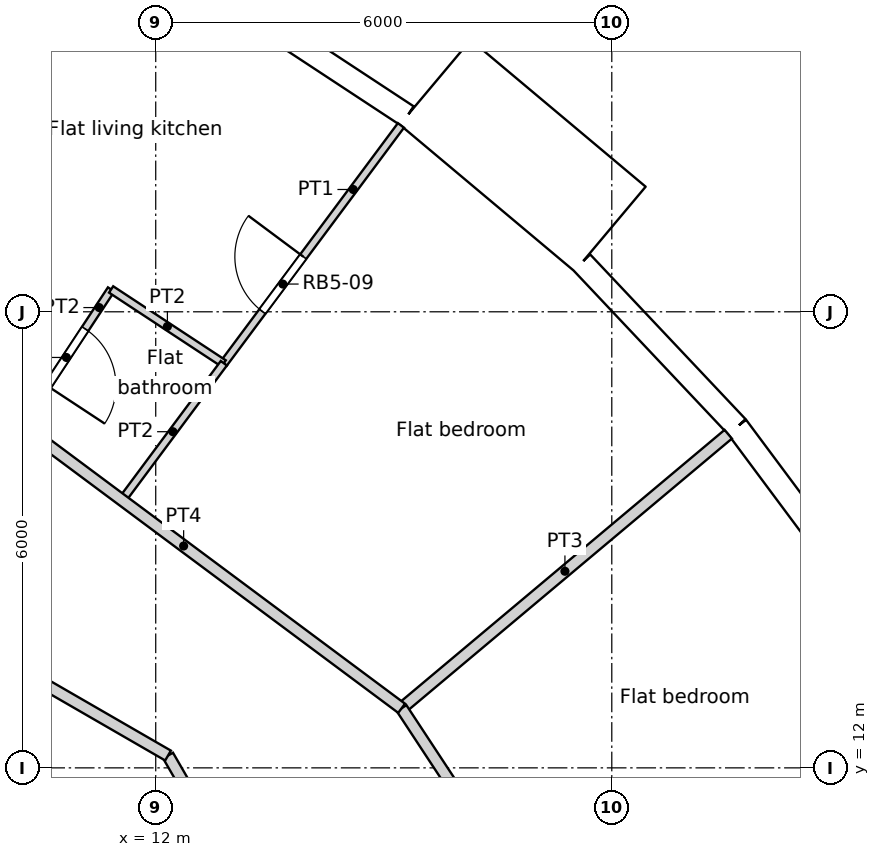
"""IFC4 building model, lengths in metres.
Left out: names, types, materials, properties, quantities, classifications, styles, units other than length and angle.
Written with IfcOpenShell. Run it as: python <this file> out.ifc"""

import sys

from ifc_helpers import new_model, si_unit, direction, frame, frame_2d, origin, origin_2d, place, context, subcontext, project, spatial, rectangle, circle, extrude, element, fill, save


model = new_model("IFC4")
c1 = context("Model", 3, precision=1e-05, world=origin(), true_north=direction((0.0, 1.0)))
c2 = subcontext(c1, "Body", "Model", "MODEL_VIEW")
j1 = project(units=[si_unit("LENGTHUNIT", "METRE"), si_unit("PLANEANGLEUNIT", "RADIAN")], contexts=[c1])
p1 = place(None, origin())
s1 = spatial("IfcSite", under=j1, at=p1, CompositionType="ELEMENT")
p2 = place(p1, origin())
s2 = spatial("IfcBuilding", under=s1, at=p2, CompositionType="ELEMENT")
p3 = place(p2, frame((0.0, 0.0, 169.2)))
s3 = spatial("IfcBuildingStorey", under=s2, at=p3, CompositionType="ELEMENT", Elevation=169.2)
for number, where, z_axis, x_axis in (
    (1, (18.805, 15.779, 0.0), (0.0, 0.0, 1.0), (1.0, 0.0, 0.0)),
    (2, (14.659, 19.69, 0.0), (0.0, 0.0, 1.0), (1.0, 0.0, 0.0)),
):
    element("IfcColumn", number, at=place(p3, frame(where, z_axis=z_axis, x_axis=x_axis)), inside=s3, PredefinedType="COLUMN", context=c2, shape_type="SweptSolid", body=[
        extrude(circle(Radius=0.6, at=origin_2d()), origin(), (0.0, 0.0, 1.0), 3.6),
    ])
p4 = place(p3, frame((11.735, 14.716, 0.0), z_axis=(0.0, 0.0, 1.0), x_axis=(1.0, 0.0, 0.0)))
e3 = element("IfcColumn", 3, at=p4, inside=s3, PredefinedType="COLUMN", context=c2, shape_type="SweptSolid", body=[
    extrude(circle(Radius=0.65, at=origin_2d()), origin(), (0.0, 0.0, 1.0), 3.6),
])
p5 = place(p3, frame((21.422, 14.101, 0.0), z_axis=(0.0, 0.0, 1.0), x_axis=(-0.597197580538, 0.80209416517, 0.0)))
e4 = element("IfcWall", 4, at=p5, inside=s3, PredefinedType="SOLIDWALL", context=c2, shape_type="SweptSolid", body=[
    extrude(rectangle(XDim=2.973, YDim=0.3, at=frame_2d((1.486, 0.0))), origin(), (0.0, 0.0, 1.0), 3.3),
])
p6 = place(p5, frame((1.486, 0.0, 1.55)))
e5 = element("IfcOpeningElement", 5, at=p6, cuts=e4, PredefinedType="OPENING", context=c2, shape_type="SweptSolid", body=[
    extrude(circle(Radius=0.9, at=origin_2d()), frame((0.0, 0.16, 0.0), z_axis=(0.0, -1.0, 0.0), x_axis=(1.0, 0.0, 0.0)), (0.0, 0.0, 1.0), 0.32),
])
p7 = place(p3, frame((19.647, 16.486, 0.0), z_axis=(0.0, 0.0, 1.0), x_axis=(-0.686235184166, 0.727379730273, 0.0)))
e6 = element("IfcWall", 6, at=p7, inside=s3, PredefinedType="SOLIDWALL", context=c2, shape_type="SweptSolid", body=[
    extrude(rectangle(XDim=2.973, YDim=0.3, at=frame_2d((1.486, 0.0))), origin(), (0.0, 0.0, 1.0), 3.3),
])
p8 = place(p7, frame((1.486, 0.0, 1.55)))
e7 = element("IfcOpeningElement", 7, at=p8, cuts=e6, PredefinedType="OPENING", context=c2, shape_type="SweptSolid", body=[
    extrude(circle(Radius=0.9, at=origin_2d()), frame((0.0, 0.16, 0.0), z_axis=(0.0, -1.0, 0.0), x_axis=(1.0, 0.0, 0.0)), (0.0, 0.0, 1.0), 0.32),
])
p9 = place(p3, frame((17.977, 19.09, -0.3), z_axis=(0.0, 0.0, 1.0), x_axis=(-0.766022196139, 0.642814121673, 0.0)))
e8 = element("IfcWall", 8, at=p9, inside=s3, PredefinedType="ELEMENTEDWALL", context=c2, shape_type="SweptSolid", body=[
    extrude(rectangle(XDim=3.0, YDim=1.45, at=frame_2d((1.5, 0.0))), origin(), (0.0, 0.0, 1.0), 3.6),
])
p10 = place(p9, frame((1.5, 0.0, 1.85)))
e9 = element("IfcOpeningElement", 9, at=p10, cuts=e8, PredefinedType="OPENING", context=c2, shape_type="SweptSolid", body=[
    extrude(circle(Radius=0.9, at=origin_2d()), frame((0.0, 0.735, 0.0), z_axis=(0.0, -1.0, 0.0), x_axis=(1.0, 0.0, 0.0)), (0.0, 0.0, 1.0), 1.47),
])
p11 = place(p3, frame((15.308, 20.578, 0.0), z_axis=(0.0, 0.0, 1.0), x_axis=(-0.835470659512, 0.549535055382, 0.0)))
e10 = element("IfcWall", 10, at=p11, inside=s3, PredefinedType="SOLIDWALL", context=c2, shape_type="SweptSolid", body=[
    extrude(rectangle(XDim=2.973, YDim=0.3, at=frame_2d((1.487, 0.0))), origin(), (0.0, 0.0, 1.0), 3.3),
])
p12 = place(p11, frame((1.486, 0.0, 1.55)))
e11 = element("IfcOpeningElement", 11, at=p12, cuts=e10, PredefinedType="OPENING", context=c2, shape_type="SweptSolid", body=[
    extrude(circle(Radius=0.9, at=origin_2d()), frame((0.0, 0.16, 0.0), z_axis=(0.0, -1.0, 0.0), x_axis=(1.0, 0.0, 0.0)), (0.0, 0.0, 1.0), 0.32),
])
p13 = place(p3, frame((12.162, 12.162, 0.0), z_axis=(0.0, 0.0, 1.0), x_axis=(0.499961633463, -0.866047553582, 0.0)))
e12 = element("IfcWall", 12, at=p13, inside=s3, PredefinedType="PARTITIONING", context=c2, shape_type="SweptSolid", body=[
    extrude(rectangle(XDim=2.15, YDim=0.15, at=frame_2d((1.075, 0.0))), origin(), (0.0, 0.0, 1.0), 3.3),
])
p14 = place(p3, frame((15.235, 12.784, 0.0), z_axis=(0.0, 0.0, 1.0), x_axis=(0.54943003049, -0.83553973071, 0.0)))
e13 = element("IfcWall", 13, at=p14, inside=s3, PredefinedType="PARTITIONING", context=c2, shape_type="SweptSolid", body=[
    extrude(rectangle(XDim=4.617, YDim=0.15, at=frame_2d((2.309, 0.0))), origin(), (0.0, 0.0, 1.0), 3.3),
])
p15 = place(p3, frame((7.877, 18.262, 0.0), z_axis=(0.0, 0.0, 1.0), x_axis=(0.802112550244, -0.597172886811, 0.0)))
e14 = element("IfcWall", 14, at=p15, inside=s3, PredefinedType="PARTITIONING", context=c2, shape_type="SweptSolid", body=[
    extrude(rectangle(XDim=9.173, YDim=0.15, at=frame_2d((4.586, 0.0))), origin(), (0.0, 0.0, 1.0), 3.3),
])
p16 = place(p15, frame((0.972, 0.0, 0.0)))
e15 = element("IfcOpeningElement", 15, at=p16, cuts=e14, PredefinedType="OPENING", context=c2, shape_type="SweptSolid", body=[
    extrude(rectangle(XDim=1.0, YDim=2.1, at=frame_2d((0.5, 1.05))), frame((0.0, 0.075, 0.0), z_axis=(0.0, -1.0, 0.0), x_axis=(1.0, 0.0, 0.0)), (0.0, 0.0, 1.0), 0.15),
])
p17 = place(p3, frame((4.452, 16.614, 0.0), z_axis=(0.0, 0.0, 1.0), x_axis=(0.866005203721, -0.500034985904, 0.0)))
e16 = element("IfcWall", 16, at=p17, inside=s3, PredefinedType="PARTITIONING", context=c2, shape_type="SweptSolid", body=[
    extrude(rectangle(XDim=8.903, YDim=0.15, at=frame_2d((4.452, 0.0))), origin(), (0.0, 0.0, 1.0), 3.3),
])
p18 = place(p3, frame((15.235, 12.784, 0.0), z_axis=(0.0, 0.0, 1.0), x_axis=(0.76609059793, 0.642732600514, 0.0)))
e17 = element("IfcWall", 17, at=p18, inside=s3, PredefinedType="PARTITIONING", context=c2, shape_type="SweptSolid", body=[
    extrude(rectangle(XDim=5.609, YDim=0.15, at=frame_2d((2.804, 0.0))), origin(), (0.0, 0.0, 1.0), 3.3),
])
p19 = place(p3, frame((12.894, 17.32, 0.0), z_axis=(0.0, 0.0, 1.0), x_axis=(0.597235338427, 0.802066051229, 0.0)))
e18 = element("IfcWall", 18, at=p19, inside=s3, PredefinedType="PARTITIONING", context=c2, shape_type="SweptSolid", body=[
    extrude(rectangle(XDim=3.905, YDim=0.1, at=frame_2d((1.952, 0.0))), origin(), (0.0, 0.0, 1.0), 3.3),
])
p20 = place(p19, frame((0.853, 0.0, 0.0)))
e19 = element("IfcOpeningElement", 19, at=p20, cuts=e18, PredefinedType="OPENING", context=c2, shape_type="SweptSolid", body=[
    extrude(rectangle(XDim=0.9, YDim=2.1, at=frame_2d((0.45, 1.05))), frame((0.0, 0.05, 0.0), z_axis=(0.0, -1.0, 0.0), x_axis=(1.0, 0.0, 0.0)), (0.0, 0.0, 1.0), 0.1),
])
p21 = place(p3, frame((11.413, 18.294, 0.0), z_axis=(0.0, 0.0, 1.0), x_axis=(0.835530238932, -0.549444464738, 0.0)))
e20 = element("IfcWall", 20, at=p21, inside=s3, PredefinedType="PARTITIONING", context=c2, shape_type="SweptSolid", body=[
    extrude(rectangle(XDim=1.772, YDim=0.1, at=frame_2d((0.886, 0.0))), origin(), (0.0, 0.0, 1.0), 3.3),
])
p22 = place(p3, frame((10.236, 16.505, 0.0), z_axis=(0.0, 0.0, 1.0), x_axis=(0.5496123138, 0.835419837279, 0.0)))
e21 = element("IfcWall", 21, at=p22, inside=s3, PredefinedType="PARTITIONING", context=c2, shape_type="SweptSolid", body=[
    extrude(rectangle(XDim=2.142, YDim=0.1, at=frame_2d((1.071, 0.0))), origin(), (0.0, 0.0, 1.0), 3.3),
])
p23 = place(p22, frame((0.621, 0.0, 0.0)))
e22 = element("IfcOpeningElement", 22, at=p23, cuts=e21, PredefinedType="OPENING", context=c2, shape_type="SweptSolid", body=[
    extrude(rectangle(XDim=0.9, YDim=2.0, at=frame_2d((0.45, 1.0))), frame((0.0, 0.05, 0.0), z_axis=(0.0, -1.0, 0.0), x_axis=(1.0, 0.0, 0.0)), (0.0, 0.0, 1.0), 0.1),
])
p24 = place(p3, frame((11.556, 15.522, 0.0), z_axis=(0.0, 0.0, 1.0), x_axis=(0.596950542241, 0.802278037914, 0.0)))
e23 = element("IfcWall", 23, at=p24, inside=s3, PredefinedType="PARTITIONING", context=c2, shape_type="SweptSolid", body=[
    extrude(rectangle(XDim=2.245, YDim=0.1, at=frame_2d((1.123, 0.0))), origin(), (0.0, 0.0, 1.0), 3.3),
])
p25 = place(p6, origin())
e24 = element("IfcWindow", 24, at=p25, inside=s3, PartitioningType="SINGLE_PANEL", PredefinedType="WINDOW", context=c2, shape_type="SweptSolid", body=[
    extrude(circle(Radius=0.9, at=origin_2d()), frame((0.0, 0.12, 0.0), z_axis=(0.0, -1.0, 0.0), x_axis=(1.0, 0.0, 0.0)), (0.0, 0.0, 1.0), 0.1),
])
fill(e5, e24)
p26 = place(p8, origin())
e25 = element("IfcWindow", 25, at=p26, inside=s3, PartitioningType="SINGLE_PANEL", PredefinedType="WINDOW", context=c2, shape_type="SweptSolid", body=[
    extrude(circle(Radius=0.9, at=origin_2d()), frame((0.0, 0.12, 0.0), z_axis=(0.0, -1.0, 0.0), x_axis=(1.0, 0.0, 0.0)), (0.0, 0.0, 1.0), 0.1),
])
fill(e7, e25)
p27 = place(p10, origin())
e26 = element("IfcWindow", 26, at=p27, inside=s3, PartitioningType="SINGLE_PANEL", PredefinedType="WINDOW", context=c2, shape_type="SweptSolid", body=[
    extrude(circle(Radius=0.9, at=origin_2d()), frame((0.0, 0.695, 0.0), z_axis=(0.0, -1.0, 0.0), x_axis=(1.0, 0.0, 0.0)), (0.0, 0.0, 1.0), 0.1),
])
fill(e9, e26)
p28 = place(p12, origin())
e27 = element("IfcWindow", 27, at=p28, inside=s3, PartitioningType="SINGLE_PANEL", PredefinedType="WINDOW", context=c2, shape_type="SweptSolid", body=[
    extrude(circle(Radius=0.9, at=origin_2d()), frame((0.0, 0.12, 0.0), z_axis=(0.0, -1.0, 0.0), x_axis=(1.0, 0.0, 0.0)), (0.0, 0.0, 1.0), 0.1),
])
fill(e11, e27)
p29 = place(p20, origin())
e28 = element("IfcDoor", 28, at=p29, inside=s3, OperationType="SINGLE_SWING_RIGHT", PredefinedType="DOOR", context=c2, shape_type="SweptSolid", body=[
    extrude(rectangle(XDim=0.9, YDim=2.1, at=frame_2d((0.45, 1.05))), frame((0.0, 0.025, 0.0), z_axis=(0.0, -1.0, 0.0), x_axis=(1.0, 0.0, 0.0)), (0.0, 0.0, 1.0), 0.05),
])
fill(e19, e28)
p30 = place(p23, origin())
e29 = element("IfcDoor", 29, at=p30, inside=s3, OperationType="SINGLE_SWING_RIGHT", PredefinedType="DOOR", context=c2, shape_type="SweptSolid", body=[
    extrude(rectangle(XDim=0.9, YDim=2.0, at=frame_2d((0.45, 1.0))), frame((0.0, 0.025, 0.0), z_axis=(0.0, -1.0, 0.0), x_axis=(1.0, 0.0, 0.0)), (0.0, 0.0, 1.0), 0.05),
])
fill(e22, e29)
save(model, sys.argv[1])
